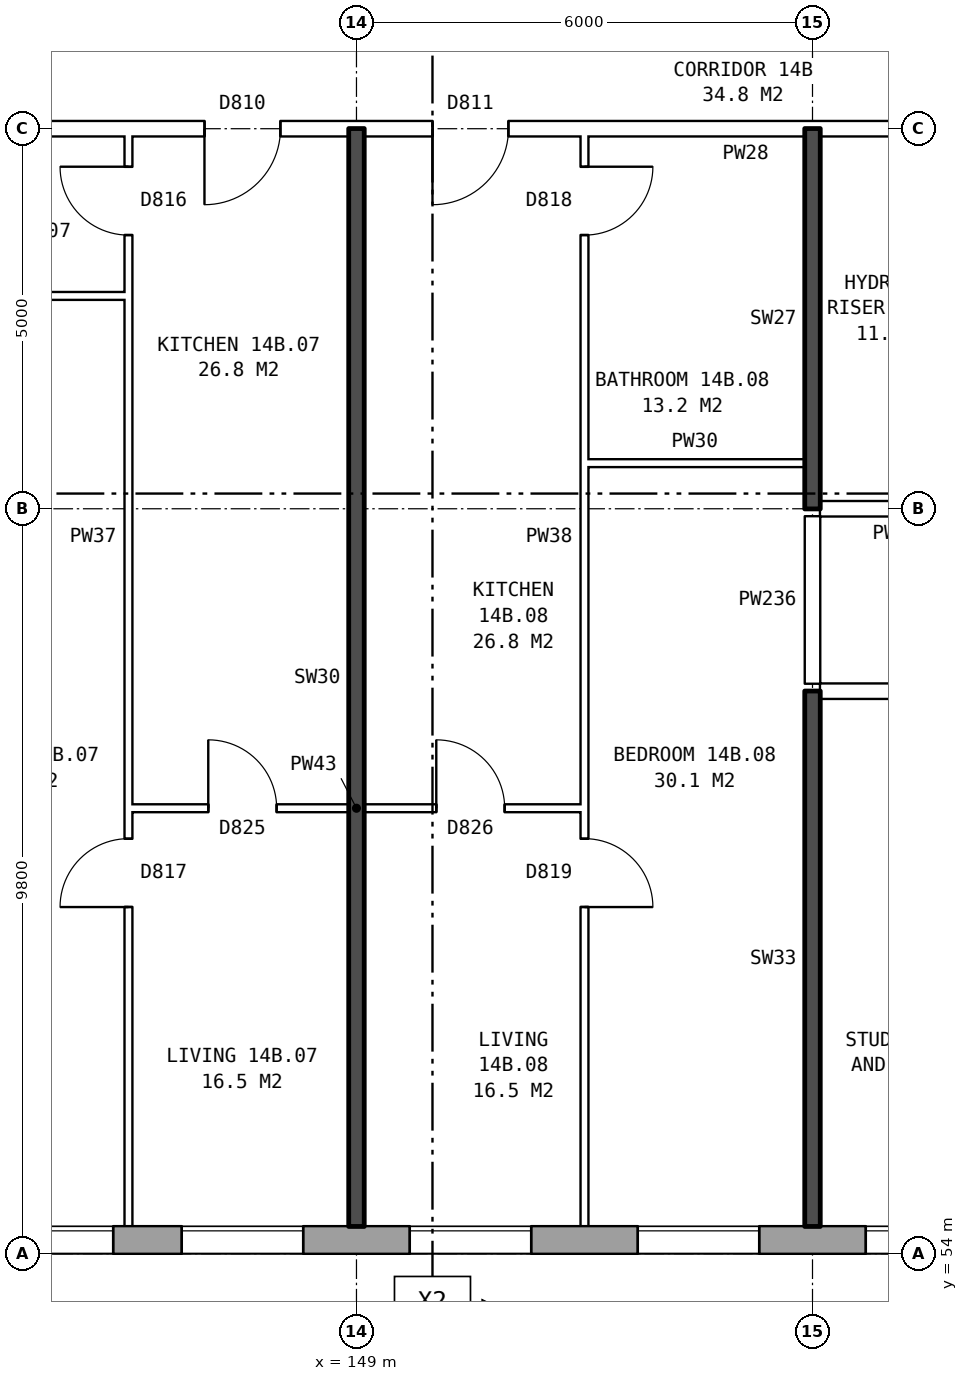
"""IFC4 building model, lengths in metres.
Left out: names, types, materials, properties, quantities, classifications, styles, units other than length and angle.
Written with IfcOpenShell. Run it as: python <this file> out.ifc"""

import sys

from ifc_helpers import new_model, si_unit, direction, frame, frame_2d, origin, place, context, subcontext, project, spatial, rectangle, extrude, element, fill, save


model = new_model("IFC4")
c1 = context("Model", 3, precision=1e-05, world=origin(), true_north=direction((0.0, 1.0)))
c2 = subcontext(c1, "Body", "Model", "MODEL_VIEW")
j1 = project(units=[si_unit("LENGTHUNIT", "METRE"), si_unit("PLANEANGLEUNIT", "RADIAN")], contexts=[c1])
p1 = place(None, origin())
s1 = spatial("IfcSite", under=j1, at=p1, CompositionType="ELEMENT")
p2 = place(p1, origin())
s2 = spatial("IfcBuilding", under=s1, at=p2, CompositionType="ELEMENT")
p3 = place(p2, frame((0.0, 0.0, 53.6)))
s3 = spatial("IfcBuildingStorey", under=s2, at=p3, CompositionType="ELEMENT", Elevation=53.6)
p4 = place(p3, frame((134.075, 54.18, 0.0), z_axis=(0.0, 0.0, 1.0), x_axis=(1.0, 0.0, 0.0)))
e1 = element("IfcWall", 1, at=p4, inside=s3, PredefinedType="STANDARD", context=c2, shape_type="SweptSolid", body=[
    extrude(rectangle(XDim=39.351, YDim=0.36, at=frame_2d((19.675, 0.0))), origin(), (0.0, 0.0, 1.0), 2.85),
])
p5 = place(p4, frame((0.625, 0.0, 0.8)))
e2 = element("IfcOpeningElement", 2, at=p5, cuts=e1, PredefinedType="OPENING", context=c2, shape_type="SweptSolid", body=[
    extrude(rectangle(XDim=1.6, YDim=1.8, at=frame_2d((0.8, 0.9))), frame((0.0, 0.19, 0.0), z_axis=(0.0, -1.0, 0.0), x_axis=(1.0, 0.0, 0.0)), (0.0, 0.0, 1.0), 0.38),
])
p6 = place(p4, frame((3.625, 0.0, 0.8)))
e3 = element("IfcOpeningElement", 3, at=p6, cuts=e1, PredefinedType="OPENING", context=c2, shape_type="SweptSolid", body=[
    extrude(rectangle(XDim=1.6, YDim=1.8, at=frame_2d((0.8, 0.9))), frame((0.0, 0.19, 0.0), z_axis=(0.0, -1.0, 0.0), x_axis=(1.0, 0.0, 0.0)), (0.0, 0.0, 1.0), 0.38),
])
p7 = place(p4, frame((6.625, 0.0, 0.8)))
e4 = element("IfcOpeningElement", 4, at=p7, cuts=e1, PredefinedType="OPENING", context=c2, shape_type="SweptSolid", body=[
    extrude(rectangle(XDim=1.6, YDim=1.8, at=frame_2d((0.8, 0.9))), frame((0.0, 0.19, 0.0), z_axis=(0.0, -1.0, 0.0), x_axis=(1.0, 0.0, 0.0)), (0.0, 0.0, 1.0), 0.38),
])
p8 = place(p4, frame((9.125, 0.0, 1.65)))
e5 = element("IfcOpeningElement", 5, at=p8, cuts=e1, PredefinedType="OPENING", context=c2, shape_type="SweptSolid", body=[
    extrude(rectangle(XDim=1.0, YDim=0.9, at=frame_2d((0.5, 0.45))), frame((0.0, 0.19, 0.0), z_axis=(0.0, -1.0, 0.0), x_axis=(1.0, 0.0, 0.0)), (0.0, 0.0, 1.0), 0.38),
])
p9 = place(p4, frame((12.625, 0.0, 0.8)))
e6 = element("IfcOpeningElement", 6, at=p9, cuts=e1, PredefinedType="OPENING", context=c2, shape_type="SweptSolid", body=[
    extrude(rectangle(XDim=1.6, YDim=1.8, at=frame_2d((0.8, 0.9))), frame((0.0, 0.19, 0.0), z_axis=(0.0, -1.0, 0.0), x_axis=(1.0, 0.0, 0.0)), (0.0, 0.0, 1.0), 0.38),
])
p10 = place(p4, frame((15.625, 0.0, 0.8)))
e7 = element("IfcOpeningElement", 7, at=p10, cuts=e1, PredefinedType="OPENING", context=c2, shape_type="SweptSolid", body=[
    extrude(rectangle(XDim=1.6, YDim=1.8, at=frame_2d((0.8, 0.9))), frame((0.0, 0.19, 0.0), z_axis=(0.0, -1.0, 0.0), x_axis=(1.0, 0.0, 0.0)), (0.0, 0.0, 1.0), 0.38),
])
p11 = place(p4, frame((18.625, 0.0, 0.8)))
e8 = element("IfcOpeningElement", 8, at=p11, cuts=e1, PredefinedType="OPENING", context=c2, shape_type="SweptSolid", body=[
    extrude(rectangle(XDim=1.6, YDim=1.8, at=frame_2d((0.8, 0.9))), frame((0.0, 0.19, 0.0), z_axis=(0.0, -1.0, 0.0), x_axis=(1.0, 0.0, 0.0)), (0.0, 0.0, 1.0), 0.38),
])
p12 = place(p4, frame((21.625, 0.0, 0.8)))
e9 = element("IfcOpeningElement", 9, at=p12, cuts=e1, PredefinedType="OPENING", context=c2, shape_type="SweptSolid", body=[
    extrude(rectangle(XDim=1.6, YDim=1.8, at=frame_2d((0.8, 0.9))), frame((0.0, 0.19, 0.0), z_axis=(0.0, -1.0, 0.0), x_axis=(1.0, 0.0, 0.0)), (0.0, 0.0, 1.0), 0.38),
])
p13 = place(p4, frame((24.625, 0.0, 0.8)))
e10 = element("IfcOpeningElement", 10, at=p13, cuts=e1, PredefinedType="OPENING", context=c2, shape_type="SweptSolid", body=[
    extrude(rectangle(XDim=1.6, YDim=1.8, at=frame_2d((0.8, 0.9))), frame((0.0, 0.19, 0.0), z_axis=(0.0, -1.0, 0.0), x_axis=(1.0, 0.0, 0.0)), (0.0, 0.0, 1.0), 0.38),
])
p14 = place(p4, frame((27.125, 0.0, 0.8)))
e11 = element("IfcOpeningElement", 11, at=p14, cuts=e1, PredefinedType="OPENING", context=c2, shape_type="SweptSolid", body=[
    extrude(rectangle(XDim=0.6, YDim=0.9, at=frame_2d((0.3, 0.45))), frame((0.0, 0.19, 0.0), z_axis=(0.0, -1.0, 0.0), x_axis=(1.0, 0.0, 0.0)), (0.0, 0.0, 1.0), 0.38),
])
p15 = place(p4, frame((30.625, 0.0, 0.8)))
e12 = element("IfcOpeningElement", 12, at=p15, cuts=e1, PredefinedType="OPENING", context=c2, shape_type="SweptSolid", body=[
    extrude(rectangle(XDim=1.6, YDim=1.8, at=frame_2d((0.8, 0.9))), frame((0.0, 0.19, 0.0), z_axis=(0.0, -1.0, 0.0), x_axis=(1.0, 0.0, 0.0)), (0.0, 0.0, 1.0), 0.38),
])
p16 = place(p4, frame((33.625, 0.0, 0.8)))
e13 = element("IfcOpeningElement", 13, at=p16, cuts=e1, PredefinedType="OPENING", context=c2, shape_type="SweptSolid", body=[
    extrude(rectangle(XDim=1.6, YDim=1.8, at=frame_2d((0.8, 0.9))), frame((0.0, 0.19, 0.0), z_axis=(0.0, -1.0, 0.0), x_axis=(1.0, 0.0, 0.0)), (0.0, 0.0, 1.0), 0.38),
])
p17 = place(p4, frame((36.625, 0.0, 0.8)))
e14 = element("IfcOpeningElement", 14, at=p17, cuts=e1, PredefinedType="OPENING", context=c2, shape_type="SweptSolid", body=[
    extrude(rectangle(XDim=1.6, YDim=1.8, at=frame_2d((0.8, 0.9))), frame((0.0, 0.19, 0.0), z_axis=(0.0, -1.0, 0.0), x_axis=(1.0, 0.0, 0.0)), (0.0, 0.0, 1.0), 0.38),
])
p18 = place(p4, frame((10.725, 0.0, 0.15)))
e15 = element("IfcOpeningElement", 15, at=p18, cuts=e1, PredefinedType="OPENING", context=c2, shape_type="SweptSolid", body=[
    extrude(rectangle(XDim=1.0, YDim=0.9, at=frame_2d((0.5, 0.45))), frame((0.0, 0.19, 0.0), z_axis=(0.0, -1.0, 0.0), x_axis=(1.0, 0.0, 0.0)), (0.0, 0.0, 1.0), 0.38),
])
p19 = place(p4, frame((29.075, 0.0, 1.7)))
e16 = element("IfcOpeningElement", 16, at=p19, cuts=e1, PredefinedType="OPENING", context=c2, shape_type="SweptSolid", body=[
    extrude(rectangle(XDim=1.2, YDim=0.9, at=frame_2d((0.6, 0.45))), frame((0.0, 0.19, 0.0), z_axis=(0.0, -1.0, 0.0), x_axis=(1.0, 0.0, 0.0)), (0.0, 0.0, 1.0), 0.38),
])
p20 = place(p3, frame((146.0, 59.86, 0.0), z_axis=(0.0, 0.0, 1.0), x_axis=(1.0, 0.0, 0.0)))
e17 = element("IfcWall", 17, at=p20, inside=s3, PredefinedType="PARTITIONING", context=c2, shape_type="SweptSolid", body=[
    extrude(rectangle(XDim=6.0, YDim=0.1, at=frame_2d((3.0, 0.0))), origin(), (0.0, 0.0, 1.0), 2.85),
])
p21 = place(p20, frame((1.05, 0.0, 0.0)))
e18 = element("IfcOpeningElement", 18, at=p21, cuts=e17, PredefinedType="OPENING", context=c2, shape_type="SweptSolid", body=[
    extrude(rectangle(XDim=0.9, YDim=2.1, at=frame_2d((0.45, 1.05))), frame((0.0, 0.06, 0.0), z_axis=(0.0, -1.0, 0.0), x_axis=(1.0, 0.0, 0.0)), (0.0, 0.0, 1.0), 0.12),
])
p22 = place(p20, frame((4.05, 0.0, 0.0)))
e19 = element("IfcOpeningElement", 19, at=p22, cuts=e17, PredefinedType="OPENING", context=c2, shape_type="SweptSolid", body=[
    extrude(rectangle(XDim=0.9, YDim=2.1, at=frame_2d((0.45, 1.05))), frame((0.0, 0.06, 0.0), z_axis=(0.0, -1.0, 0.0), x_axis=(1.0, 0.0, 0.0)), (0.0, 0.0, 1.0), 0.12),
])
p23 = place(p3, frame((155.1, 61.4, 0.0), z_axis=(0.0, 0.0, 1.0), x_axis=(1.0, 0.0, 0.0)))
e20 = element("IfcWall", 20, at=p23, inside=s3, PredefinedType="PARTITIONING", context=c2, shape_type="SweptSolid", body=[
    extrude(rectangle(XDim=21.04, YDim=0.2, at=frame_2d((10.52, 0.0))), origin(), (0.0, 0.0, 1.0), 2.85),
])
p24 = place(p23, frame((1.45, 0.0, 0.0)))
e21 = element("IfcOpeningElement", 21, at=p24, cuts=e20, PredefinedType="OPENING", context=c2, shape_type="SweptSolid", body=[
    extrude(rectangle(XDim=1.0, YDim=2.1, at=frame_2d((0.5, 1.05))), frame((0.0, 0.11, 0.0), z_axis=(0.0, -1.0, 0.0), x_axis=(1.0, 0.0, 0.0)), (0.0, 0.0, 1.0), 0.22),
])
p25 = place(p23, frame((7.4, 0.0, 0.0)))
e22 = element("IfcOpeningElement", 22, at=p25, cuts=e20, PredefinedType="OPENING", context=c2, shape_type="SweptSolid", body=[
    extrude(rectangle(XDim=1.0, YDim=2.1, at=frame_2d((0.5, 1.05))), frame((0.0, 0.11, 0.0), z_axis=(0.0, -1.0, 0.0), x_axis=(1.0, 0.0, 0.0)), (0.0, 0.0, 1.0), 0.22),
])
p26 = place(p23, frame((14.4, 0.0, 0.0)))
e23 = element("IfcOpeningElement", 23, at=p26, cuts=e20, PredefinedType="OPENING", context=c2, shape_type="SweptSolid", body=[
    extrude(rectangle(XDim=1.0, YDim=2.1, at=frame_2d((0.5, 1.05))), frame((0.0, 0.11, 0.0), z_axis=(0.0, -1.0, 0.0), x_axis=(1.0, 0.0, 0.0)), (0.0, 0.0, 1.0), 0.22),
])
p27 = place(p3, frame((155.1, 63.8, 0.0), z_axis=(0.0, 0.0, 1.0), x_axis=(1.0, 0.0, 0.0)))
e24 = element("IfcWall", 24, at=p27, inside=s3, PredefinedType="PARTITIONING", context=c2, shape_type="SweptSolid", body=[
    extrude(rectangle(XDim=2.14, YDim=0.2, at=frame_2d((1.07, 0.0))), origin(), (0.0, 0.0, 1.0), 2.85),
])
p28 = place(p3, frame((152.0, 64.4, 0.0), z_axis=(0.0, 0.0, 1.0), x_axis=(1.0, 0.0, 0.0)))
e25 = element("IfcWall", 25, at=p28, inside=s3, PredefinedType="PARTITIONING", context=c2, shape_type="SweptSolid", body=[
    extrude(rectangle(XDim=2.9, YDim=0.1, at=frame_2d((1.45, 0.0))), origin(), (0.0, 0.0, 1.0), 2.85),
])
p29 = place(p3, frame((142.76, 66.6, 0.0), z_axis=(0.0, 0.0, 1.0), x_axis=(1.0, 0.0, 0.0)))
e26 = element("IfcWall", 26, at=p29, inside=s3, PredefinedType="PARTITIONING", context=c2, shape_type="SweptSolid", body=[
    extrude(rectangle(XDim=3.24, YDim=0.1, at=frame_2d((1.62, 0.0))), origin(), (0.0, 0.0, 1.0), 2.85),
])
p30 = place(p3, frame((142.76, 68.8, 0.0), z_axis=(0.0, 0.0, 1.0), x_axis=(1.0, 0.0, 0.0)))
e27 = element("IfcWall", 27, at=p30, inside=s3, PredefinedType="PARTITIONING", context=c2, shape_type="SweptSolid", body=[
    extrude(rectangle(XDim=14.48, YDim=0.2, at=frame_2d((7.24, 0.0))), origin(), (0.0, 0.0, 1.0), 2.85),
])
p31 = place(p30, frame((4.24, 0.0, 0.0)))
e28 = element("IfcOpeningElement", 28, at=p31, cuts=e27, PredefinedType="OPENING", context=c2, shape_type="SweptSolid", body=[
    extrude(rectangle(XDim=1.0, YDim=2.1, at=frame_2d((0.5, 1.05))), frame((0.0, 0.11, 0.0), z_axis=(0.0, -1.0, 0.0), x_axis=(1.0, 0.0, 0.0)), (0.0, 0.0, 1.0), 0.22),
])
p32 = place(p30, frame((7.24, 0.0, 0.0)))
e29 = element("IfcOpeningElement", 29, at=p32, cuts=e27, PredefinedType="OPENING", context=c2, shape_type="SweptSolid", body=[
    extrude(rectangle(XDim=1.0, YDim=2.1, at=frame_2d((0.5, 1.05))), frame((0.0, 0.11, 0.0), z_axis=(0.0, -1.0, 0.0), x_axis=(1.0, 0.0, 0.0)), (0.0, 0.0, 1.0), 0.22),
])
p33 = place(p3, frame((146.0, 54.36, 0.0), z_axis=(0.0, 0.0, 1.0), x_axis=(0.0, 1.0, 0.0)))
e30 = element("IfcWall", 30, at=p33, inside=s3, PredefinedType="PARTITIONING", context=c2, shape_type="SweptSolid", body=[
    extrude(rectangle(XDim=14.34, YDim=0.1, at=frame_2d((7.17, 0.0))), origin(), (0.0, 0.0, 1.0), 2.85),
])
p34 = place(p33, frame((4.2, 0.0, 0.0)))
e31 = element("IfcOpeningElement", 31, at=p34, cuts=e30, PredefinedType="OPENING", context=c2, shape_type="SweptSolid", body=[
    extrude(rectangle(XDim=0.9, YDim=2.1, at=frame_2d((0.45, 1.05))), frame((0.0, 0.06, 0.0), z_axis=(0.0, -1.0, 0.0), x_axis=(1.0, 0.0, 0.0)), (0.0, 0.0, 1.0), 0.12),
])
p35 = place(p33, frame((13.04, 0.0, 0.0)))
e32 = element("IfcOpeningElement", 32, at=p35, cuts=e30, PredefinedType="OPENING", context=c2, shape_type="SweptSolid", body=[
    extrude(rectangle(XDim=0.9, YDim=2.1, at=frame_2d((0.45, 1.05))), frame((0.0, 0.06, 0.0), z_axis=(0.0, -1.0, 0.0), x_axis=(1.0, 0.0, 0.0)), (0.0, 0.0, 1.0), 0.12),
])
p36 = place(p3, frame((149.0, 54.36, 0.0), z_axis=(0.0, 0.0, 1.0), x_axis=(0.0, 1.0, 0.0)))
e33 = element("IfcWall", 33, at=p36, inside=s3, PredefinedType="SOLIDWALL", context=c2, shape_type="SweptSolid", body=[
    extrude(rectangle(XDim=14.44, YDim=0.2, at=frame_2d((7.22, 0.0))), origin(), (0.0, 0.0, 1.0), 2.85),
])
p37 = place(p3, frame((152.0, 54.36, 0.0), z_axis=(0.0, 0.0, 1.0), x_axis=(0.0, 1.0, 0.0)))
e34 = element("IfcWall", 34, at=p37, inside=s3, PredefinedType="PARTITIONING", context=c2, shape_type="SweptSolid", body=[
    extrude(rectangle(XDim=14.34, YDim=0.1, at=frame_2d((7.17, 0.0))), origin(), (0.0, 0.0, 1.0), 2.85),
])
p38 = place(p37, frame((4.2, 0.0, 0.0)))
e35 = element("IfcOpeningElement", 35, at=p38, cuts=e34, PredefinedType="OPENING", context=c2, shape_type="SweptSolid", body=[
    extrude(rectangle(XDim=0.9, YDim=2.1, at=frame_2d((0.45, 1.05))), frame((0.0, 0.06, 0.0), z_axis=(0.0, -1.0, 0.0), x_axis=(1.0, 0.0, 0.0)), (0.0, 0.0, 1.0), 0.12),
])
p39 = place(p37, frame((13.04, 0.0, 0.0)))
e36 = element("IfcOpeningElement", 36, at=p39, cuts=e34, PredefinedType="OPENING", context=c2, shape_type="SweptSolid", body=[
    extrude(rectangle(XDim=0.9, YDim=2.1, at=frame_2d((0.45, 1.05))), frame((0.0, 0.06, 0.0), z_axis=(0.0, -1.0, 0.0), x_axis=(1.0, 0.0, 0.0)), (0.0, 0.0, 1.0), 0.12),
])
p40 = place(p3, frame((155.0, 54.36, 0.0), z_axis=(0.0, 0.0, 1.0), x_axis=(0.0, 1.0, 0.0)))
e37 = element("IfcWall", 37, at=p40, inside=s3, PredefinedType="SOLIDWALL", context=c2, shape_type="SweptSolid", body=[
    extrude(rectangle(XDim=7.04, YDim=0.2, at=frame_2d((3.52, 0.0))), origin(), (0.0, 0.0, 1.0), 2.85),
])
p41 = place(p3, frame((155.0, 61.5, 0.0), z_axis=(0.0, 0.0, 1.0), x_axis=(0.0, 1.0, 0.0)))
e38 = element("IfcWall", 38, at=p41, inside=s3, PredefinedType="PARTITIONING", context=c2, shape_type="SweptSolid", body=[
    extrude(rectangle(XDim=2.2, YDim=0.2, at=frame_2d((1.1, 0.0))), origin(), (0.0, 0.0, 1.0), 2.85),
])
p42 = place(p3, frame((155.0, 63.8, 0.0), z_axis=(0.0, 0.0, 1.0), x_axis=(0.0, 1.0, 0.0)))
e39 = element("IfcWall", 39, at=p42, inside=s3, PredefinedType="SOLIDWALL", context=c2, shape_type="SweptSolid", body=[
    extrude(rectangle(XDim=5.0, YDim=0.2, at=frame_2d((2.5, 0.0))), origin(), (0.0, 0.0, 1.0), 2.85),
])
p43 = place(p9, origin())
e40 = element("IfcWindow", 40, at=p43, inside=s3, PartitioningType="SINGLE_PANEL", PredefinedType="WINDOW", context=c2, shape_type="SweptSolid", body=[
    extrude(rectangle(XDim=1.6, YDim=1.8, at=frame_2d((0.8, 0.9))), frame((0.0, 0.15, 0.0), z_axis=(0.0, -1.0, 0.0), x_axis=(1.0, 0.0, 0.0)), (0.0, 0.0, 1.0), 0.06),
])
fill(e6, e40)
p44 = place(p10, origin())
e41 = element("IfcWindow", 41, at=p44, inside=s3, PartitioningType="SINGLE_PANEL", PredefinedType="WINDOW", context=c2, shape_type="SweptSolid", body=[
    extrude(rectangle(XDim=1.6, YDim=1.8, at=frame_2d((0.8, 0.9))), frame((0.0, 0.15, 0.0), z_axis=(0.0, -1.0, 0.0), x_axis=(1.0, 0.0, 0.0)), (0.0, 0.0, 1.0), 0.06),
])
fill(e7, e41)
p45 = place(p11, origin())
e42 = element("IfcWindow", 42, at=p45, inside=s3, PartitioningType="SINGLE_PANEL", PredefinedType="WINDOW", context=c2, shape_type="SweptSolid", body=[
    extrude(rectangle(XDim=1.6, YDim=1.8, at=frame_2d((0.8, 0.9))), frame((0.0, 0.15, 0.0), z_axis=(0.0, -1.0, 0.0), x_axis=(1.0, 0.0, 0.0)), (0.0, 0.0, 1.0), 0.06),
])
fill(e8, e42)
p46 = place(p12, origin())
e43 = element("IfcWindow", 43, at=p46, inside=s3, PartitioningType="SINGLE_PANEL", PredefinedType="WINDOW", context=c2, shape_type="SweptSolid", body=[
    extrude(rectangle(XDim=1.6, YDim=1.8, at=frame_2d((0.8, 0.9))), frame((0.0, 0.15, 0.0), z_axis=(0.0, -1.0, 0.0), x_axis=(1.0, 0.0, 0.0)), (0.0, 0.0, 1.0), 0.06),
])
fill(e9, e43)
p47 = place(p34, origin())
e44 = element("IfcDoor", 44, at=p47, inside=s3, OperationType="SINGLE_SWING_LEFT", PredefinedType="DOOR", context=c2, shape_type="SweptSolid", body=[
    extrude(rectangle(XDim=0.9, YDim=2.1, at=frame_2d((0.45, 1.05))), frame((0.0, 0.025, 0.0), z_axis=(0.0, -1.0, 0.0), x_axis=(1.0, 0.0, 0.0)), (0.0, 0.0, 1.0), 0.05),
])
fill(e31, e44)
p48 = place(p31, frame((1.0, 0.0, 0.0), z_axis=(0.0, 0.0, 1.0), x_axis=(-1.0, 0.0, 0.0)))
e45 = element("IfcDoor", 45, at=p48, inside=s3, OperationType="SINGLE_SWING_RIGHT", PredefinedType="DOOR", context=c2, shape_type="SweptSolid", body=[
    extrude(rectangle(XDim=1.0, YDim=2.1, at=frame_2d((0.5, 1.05))), frame((0.0, 0.025, 0.0), z_axis=(0.0, -1.0, 0.0), x_axis=(1.0, 0.0, 0.0)), (0.0, 0.0, 1.0), 0.05),
])
fill(e28, e45)
p49 = place(p21, origin())
e46 = element("IfcDoor", 46, at=p49, inside=s3, OperationType="SINGLE_SWING_LEFT", PredefinedType="DOOR", context=c2, shape_type="SweptSolid", body=[
    extrude(rectangle(XDim=0.9, YDim=2.1, at=frame_2d((0.45, 1.05))), frame((0.0, 0.025, 0.0), z_axis=(0.0, -1.0, 0.0), x_axis=(1.0, 0.0, 0.0)), (0.0, 0.0, 1.0), 0.05),
])
fill(e18, e46)
p50 = place(p35, origin())
e47 = element("IfcDoor", 47, at=p50, inside=s3, OperationType="SINGLE_SWING_RIGHT", PredefinedType="DOOR", context=c2, shape_type="SweptSolid", body=[
    extrude(rectangle(XDim=0.9, YDim=2.1, at=frame_2d((0.45, 1.05))), frame((0.0, 0.025, 0.0), z_axis=(0.0, -1.0, 0.0), x_axis=(1.0, 0.0, 0.0)), (0.0, 0.0, 1.0), 0.05),
])
fill(e32, e47)
p51 = place(p38, frame((0.9, 0.0, 0.0), z_axis=(0.0, 0.0, 1.0), x_axis=(-1.0, 0.0, 0.0)))
e48 = element("IfcDoor", 48, at=p51, inside=s3, OperationType="SINGLE_SWING_RIGHT", PredefinedType="DOOR", context=c2, shape_type="SweptSolid", body=[
    extrude(rectangle(XDim=0.9, YDim=2.1, at=frame_2d((0.45, 1.05))), frame((0.0, 0.025, 0.0), z_axis=(0.0, -1.0, 0.0), x_axis=(1.0, 0.0, 0.0)), (0.0, 0.0, 1.0), 0.05),
])
fill(e35, e48)
p52 = place(p32, frame((1.0, 0.0, 0.0), z_axis=(0.0, 0.0, 1.0), x_axis=(-1.0, 0.0, 0.0)))
e49 = element("IfcDoor", 49, at=p52, inside=s3, OperationType="SINGLE_SWING_RIGHT", PredefinedType="DOOR", context=c2, shape_type="SweptSolid", body=[
    extrude(rectangle(XDim=1.0, YDim=2.1, at=frame_2d((0.5, 1.05))), frame((0.0, 0.025, 0.0), z_axis=(0.0, -1.0, 0.0), x_axis=(1.0, 0.0, 0.0)), (0.0, 0.0, 1.0), 0.05),
])
fill(e29, e49)
p53 = place(p22, origin())
e50 = element("IfcDoor", 50, at=p53, inside=s3, OperationType="SINGLE_SWING_LEFT", PredefinedType="DOOR", context=c2, shape_type="SweptSolid", body=[
    extrude(rectangle(XDim=0.9, YDim=2.1, at=frame_2d((0.45, 1.05))), frame((0.0, 0.025, 0.0), z_axis=(0.0, -1.0, 0.0), x_axis=(1.0, 0.0, 0.0)), (0.0, 0.0, 1.0), 0.05),
])
fill(e19, e50)
p54 = place(p39, frame((0.9, 0.0, 0.0), z_axis=(0.0, 0.0, 1.0), x_axis=(-1.0, 0.0, 0.0)))
e51 = element("IfcDoor", 51, at=p54, inside=s3, OperationType="SINGLE_SWING_LEFT", PredefinedType="DOOR", context=c2, shape_type="SweptSolid", body=[
    extrude(rectangle(XDim=0.9, YDim=2.1, at=frame_2d((0.45, 1.05))), frame((0.0, 0.025, 0.0), z_axis=(0.0, -1.0, 0.0), x_axis=(1.0, 0.0, 0.0)), (0.0, 0.0, 1.0), 0.05),
])
fill(e36, e51)
p55 = place(p18, origin())
e52 = element("IfcWindow", 52, at=p55, inside=s3, PartitioningType="SINGLE_PANEL", PredefinedType="WINDOW", context=c2, shape_type="SweptSolid", body=[
    extrude(rectangle(XDim=1.0, YDim=0.9, at=frame_2d((0.5, 0.45))), frame((0.0, 0.15, 0.0), z_axis=(0.0, -1.0, 0.0), x_axis=(1.0, 0.0, 0.0)), (0.0, 0.0, 1.0), 0.06),
])
fill(e15, e52)
save(model, sys.argv[1])
